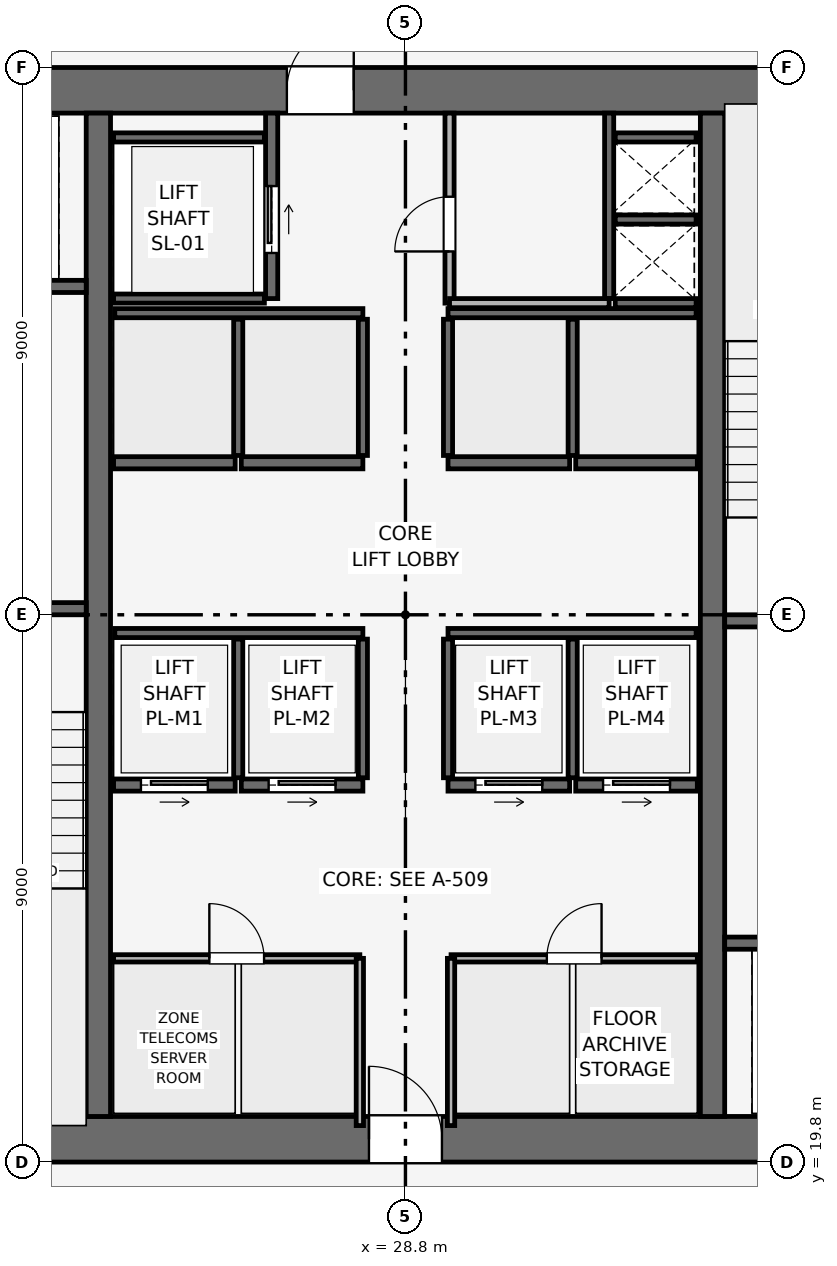
"""IFC4 building model, lengths in metres.
Left out: names, types, materials, properties, quantities, classifications, styles, units other than length and angle.
Written with IfcOpenShell. Run it as: python <this file> out.ifc"""

import sys

from ifc_helpers import new_model, si_unit, direction, frame, frame_2d, origin, place, context, subcontext, project, spatial, rectangle, extrude, element, fill, save


model = new_model("IFC4")
c1 = context("Model", 3, precision=1e-05, world=origin(), true_north=direction((0.0, 1.0)))
c2 = subcontext(c1, "Body", "Model", "MODEL_VIEW")
j1 = project(units=[si_unit("LENGTHUNIT", "METRE"), si_unit("PLANEANGLEUNIT", "RADIAN")], contexts=[c1])
p1 = place(None, origin())
s1 = spatial("IfcSite", under=j1, at=p1, CompositionType="ELEMENT")
p2 = place(p1, origin())
s2 = spatial("IfcBuilding", under=s1, at=p2, CompositionType="ELEMENT")
p3 = place(p2, frame((0.0, 0.0, 203.7)))
s3 = spatial("IfcBuildingStorey", under=s2, at=p3, CompositionType="ELEMENT", Elevation=203.7)
p4 = place(p3, frame((19.8, 20.175, 0.0), z_axis=(0.0, 0.0, 1.0), x_axis=(1.0, 0.0, 0.0)))
e1 = element("IfcWall", 1, at=p4, inside=s3, PredefinedType="SHEAR", context=c2, shape_type="SweptSolid", body=[
    extrude(rectangle(XDim=18.0, YDim=0.75, at=frame_2d((9.0, 0.0))), origin(), (0.0, 0.0, 1.0), 3.75),
])
p5 = place(p4, frame((8.4, 0.0, 0.0)))
e2 = element("IfcOpeningElement", 2, at=p5, cuts=e1, PredefinedType="OPENING", context=c2, shape_type="SweptSolid", body=[
    extrude(rectangle(XDim=1.2, YDim=2.2, at=frame_2d((0.6, 1.1))), frame((0.0, 0.385, 0.0), z_axis=(0.0, -1.0, 0.0), x_axis=(1.0, 0.0, 0.0)), (0.0, 0.0, 1.0), 0.77),
])
p6 = place(p3, frame((19.8, 37.425, 0.0), z_axis=(0.0, 0.0, 1.0), x_axis=(1.0, 0.0, 0.0)))
e3 = element("IfcWall", 3, at=p6, inside=s3, PredefinedType="SHEAR", context=c2, shape_type="SweptSolid", body=[
    extrude(rectangle(XDim=18.0, YDim=0.75, at=frame_2d((9.0, 0.0))), origin(), (0.0, 0.0, 1.0), 3.75),
])
p7 = place(p6, frame((7.05, 0.0, 0.0)))
e4 = element("IfcOpeningElement", 4, at=p7, cuts=e3, PredefinedType="OPENING", context=c2, shape_type="SweptSolid", body=[
    extrude(rectangle(XDim=1.1, YDim=2.15, at=frame_2d((0.55, 1.075))), frame((0.0, 0.385, 0.0), z_axis=(0.0, -1.0, 0.0), x_axis=(1.0, 0.0, 0.0)), (0.0, 0.0, 1.0), 0.77),
])
for number, where, z_axis, x_axis in (
    (5, (23.75, 20.55, 0.0), (0.0, 0.0, 1.0), (0.0, 1.0, 0.0)),
    (6, (33.85, 20.55, 0.0), (0.0, 0.0, 1.0), (0.0, 1.0, 0.0)),
):
    element("IfcWall", number, at=place(p3, frame(where, z_axis=z_axis, x_axis=x_axis)), inside=s3, PredefinedType="SHEAR", context=c2, shape_type="SweptSolid", body=[
        extrude(rectangle(XDim=16.5, YDim=0.4, at=frame_2d((8.25, 0.0))), origin(), (0.0, 0.0, 1.0), 3.75),
    ])
p8 = place(p3, frame((20.4, 28.9, 0.0), z_axis=(0.0, 0.0, 1.0), x_axis=(1.0, 0.0, 0.0)))
e7 = element("IfcWall", 7, at=p8, inside=s3, PredefinedType="SHEAR", context=c2, shape_type="SweptSolid", body=[
    extrude(rectangle(XDim=3.15, YDim=0.2, at=frame_2d((1.575, 0.0))), origin(), (0.0, 0.0, 1.0), 3.5),
])
p9 = place(p8, frame((0.8, 0.0, 0.0)))
e8 = element("IfcOpeningElement", 8, at=p9, cuts=e7, PredefinedType="OPENING", context=c2, shape_type="SweptSolid", body=[
    extrude(rectangle(XDim=1.0, YDim=2.1, at=frame_2d((0.5, 1.05))), frame((0.0, 0.11, 0.0), z_axis=(0.0, -1.0, 0.0), x_axis=(1.0, 0.0, 0.0)), (0.0, 0.0, 1.0), 0.22),
])
p10 = place(p3, frame((34.05, 28.7, 0.0), z_axis=(0.0, 0.0, 1.0), x_axis=(1.0, 0.0, 0.0)))
e9 = element("IfcWall", 9, at=p10, inside=s3, PredefinedType="SHEAR", context=c2, shape_type="SweptSolid", body=[
    extrude(rectangle(XDim=3.15, YDim=0.2, at=frame_2d((1.575, 0.0))), origin(), (0.0, 0.0, 1.0), 3.5),
])
p11 = place(p10, frame((0.8, 0.0, 0.0)))
e10 = element("IfcOpeningElement", 10, at=p11, cuts=e9, PredefinedType="OPENING", context=c2, shape_type="SweptSolid", body=[
    extrude(rectangle(XDim=1.0, YDim=2.1, at=frame_2d((0.5, 1.05))), frame((0.0, 0.11, 0.0), z_axis=(0.0, -1.0, 0.0), x_axis=(1.0, 0.0, 0.0)), (0.0, 0.0, 1.0), 0.22),
])
p12 = place(p3, frame((32.15, 34.0, 0.0), z_axis=(0.0, 0.0, 1.0), x_axis=(0.0, 1.0, 0.0)))
e11 = element("IfcWall", 11, at=p12, inside=s3, PredefinedType="SHEAR", context=c2, shape_type="SweptSolid", body=[
    extrude(rectangle(XDim=3.05, YDim=0.15, at=frame_2d((1.525, 0.0))), origin(), (0.0, 0.0, 1.0), 3.5),
])
for number, where, z_axis, x_axis in (
    (12, (32.25, 33.925, 0.0), (0.0, 0.0, 1.0), (1.0, 0.0, 0.0)),
    (13, (32.25, 35.3, 0.0), (0.0, 0.0, 1.0), (1.0, 0.0, 0.0)),
):
    element("IfcWall", number, at=place(p3, frame(where, z_axis=z_axis, x_axis=x_axis)), inside=s3, PredefinedType="SHEAR", context=c2, shape_type="SweptSolid", body=[
        extrude(rectangle(XDim=1.33, YDim=0.15, at=frame_2d((0.665, 0.0))), origin(), (0.0, 0.0, 1.0), 3.5),
    ])
p13 = place(p3, frame((20.5, 34.2, 0.0), z_axis=(0.0, 0.0, 1.0), x_axis=(1.0, 0.0, 0.0)))
e14 = element("IfcWall", 14, at=p13, inside=s3, PredefinedType="SHEAR", context=c2, shape_type="SweptSolid", body=[
    extrude(rectangle(XDim=3.05, YDim=0.2, at=frame_2d((1.525, 0.0))), origin(), (0.0, 0.0, 1.0), 3.5),
])
p14 = place(p13, frame((0.75, 0.0, 0.0)))
e15 = element("IfcOpeningElement", 15, at=p14, cuts=e14, PredefinedType="OPENING", context=c2, shape_type="SweptSolid", body=[
    extrude(rectangle(XDim=1.1, YDim=2.15, at=frame_2d((0.55, 1.075))), frame((0.0, 0.11, 0.0), z_axis=(0.0, -1.0, 0.0), x_axis=(1.0, 0.0, 0.0)), (0.0, 0.0, 1.0), 0.22),
])
p15 = place(p3, frame((34.05, 23.4, 0.0), z_axis=(0.0, 0.0, 1.0), x_axis=(1.0, 0.0, 0.0)))
e16 = element("IfcWall", 16, at=p15, inside=s3, PredefinedType="SHEAR", context=c2, shape_type="SweptSolid", body=[
    extrude(rectangle(XDim=3.05, YDim=0.2, at=frame_2d((1.525, 0.0))), origin(), (0.0, 0.0, 1.0), 3.5),
])
p16 = place(p15, frame((1.2, 0.0, 0.0)))
e17 = element("IfcOpeningElement", 17, at=p16, cuts=e16, PredefinedType="OPENING", context=c2, shape_type="SweptSolid", body=[
    extrude(rectangle(XDim=1.1, YDim=2.15, at=frame_2d((0.55, 1.075))), frame((0.0, 0.11, 0.0), z_axis=(0.0, -1.0, 0.0), x_axis=(1.0, 0.0, 0.0)), (0.0, 0.0, 1.0), 0.22),
])
p17 = place(p3, frame((26.6, 34.0, 0.0), z_axis=(0.0, 0.0, 1.0), x_axis=(0.0, 1.0, 0.0)))
e18 = element("IfcWall", 18, at=p17, inside=s3, PredefinedType="SHEAR", context=c2, shape_type="SweptSolid", body=[
    extrude(rectangle(XDim=3.05, YDim=0.2, at=frame_2d((1.525, 0.0))), origin(), (0.0, 0.0, 1.0), 3.5),
])
p18 = place(p17, frame((0.75, 0.0, 0.0)))
e19 = element("IfcOpeningElement", 19, at=p18, cuts=e18, PredefinedType="OPENING", context=c2, shape_type="SweptSolid", body=[
    extrude(rectangle(XDim=1.1, YDim=2.15, at=frame_2d((0.55, 1.075))), frame((0.0, 0.11, 0.0), z_axis=(0.0, -1.0, 0.0), x_axis=(1.0, 0.0, 0.0)), (0.0, 0.0, 1.0), 0.22),
])
for number, where, z_axis, x_axis in (
    (20, (24.0, 34.0, 0.0), (0.0, 0.0, 1.0), (1.0, 0.0, 0.0)),
    (21, (24.0, 36.65, 0.0), (0.0, 0.0, 1.0), (1.0, 0.0, 0.0)),
):
    element("IfcWall", number, at=place(p3, frame(where, z_axis=z_axis, x_axis=x_axis)), inside=s3, PredefinedType="SHEAR", context=c2, shape_type="SweptSolid", body=[
        extrude(rectangle(XDim=2.48, YDim=0.15, at=frame_2d((1.24, 0.0))), origin(), (0.0, 0.0, 1.0), 3.5),
    ])
p19 = place(p3, frame((24.0, 26.0, 0.0), z_axis=(0.0, 0.0, 1.0), x_axis=(1.0, 0.0, 0.0)))
e22 = element("IfcWall", 22, at=p19, inside=s3, PredefinedType="SHEAR", context=c2, shape_type="SweptSolid", body=[
    extrude(rectangle(XDim=2.0, YDim=0.2, at=frame_2d((1.0, 0.0))), origin(), (0.0, 0.0, 1.0), 3.5),
])
p20 = place(p19, frame((0.45, 0.0, 0.0)))
e23 = element("IfcOpeningElement", 23, at=p20, cuts=e22, PredefinedType="OPENING", context=c2, shape_type="SweptSolid", body=[
    extrude(rectangle(XDim=1.1, YDim=2.15, at=frame_2d((0.55, 1.075))), frame((0.0, 0.11, 0.0), z_axis=(0.0, -1.0, 0.0), x_axis=(1.0, 0.0, 0.0)), (0.0, 0.0, 1.0), 0.22),
])
p21 = place(p3, frame((26.1, 26.0, 0.0), z_axis=(0.0, 0.0, 1.0), x_axis=(1.0, 0.0, 0.0)))
e24 = element("IfcWall", 24, at=p21, inside=s3, PredefinedType="SHEAR", context=c2, shape_type="SweptSolid", body=[
    extrude(rectangle(XDim=2.0, YDim=0.2, at=frame_2d((1.0, 0.0))), origin(), (0.0, 0.0, 1.0), 3.5),
])
p22 = place(p21, frame((0.45, 0.0, 0.0)))
e25 = element("IfcOpeningElement", 25, at=p22, cuts=e24, PredefinedType="OPENING", context=c2, shape_type="SweptSolid", body=[
    extrude(rectangle(XDim=1.1, YDim=2.15, at=frame_2d((0.55, 1.075))), frame((0.0, 0.11, 0.0), z_axis=(0.0, -1.0, 0.0), x_axis=(1.0, 0.0, 0.0)), (0.0, 0.0, 1.0), 0.22),
])
p23 = place(p3, frame((29.5, 26.0, 0.0), z_axis=(0.0, 0.0, 1.0), x_axis=(1.0, 0.0, 0.0)))
e26 = element("IfcWall", 26, at=p23, inside=s3, PredefinedType="SHEAR", context=c2, shape_type="SweptSolid", body=[
    extrude(rectangle(XDim=2.0, YDim=0.2, at=frame_2d((1.0, 0.0))), origin(), (0.0, 0.0, 1.0), 3.5),
])
p24 = place(p23, frame((0.45, 0.0, 0.0)))
e27 = element("IfcOpeningElement", 27, at=p24, cuts=e26, PredefinedType="OPENING", context=c2, shape_type="SweptSolid", body=[
    extrude(rectangle(XDim=1.1, YDim=2.15, at=frame_2d((0.55, 1.075))), frame((0.0, 0.11, 0.0), z_axis=(0.0, -1.0, 0.0), x_axis=(1.0, 0.0, 0.0)), (0.0, 0.0, 1.0), 0.22),
])
p25 = place(p3, frame((31.6, 26.0, 0.0), z_axis=(0.0, 0.0, 1.0), x_axis=(1.0, 0.0, 0.0)))
e28 = element("IfcWall", 28, at=p25, inside=s3, PredefinedType="SHEAR", context=c2, shape_type="SweptSolid", body=[
    extrude(rectangle(XDim=2.0, YDim=0.2, at=frame_2d((1.0, 0.0))), origin(), (0.0, 0.0, 1.0), 3.5),
])
p26 = place(p25, frame((0.45, 0.0, 0.0)))
e29 = element("IfcOpeningElement", 29, at=p26, cuts=e28, PredefinedType="OPENING", context=c2, shape_type="SweptSolid", body=[
    extrude(rectangle(XDim=1.1, YDim=2.15, at=frame_2d((0.55, 1.075))), frame((0.0, 0.11, 0.0), z_axis=(0.0, -1.0, 0.0), x_axis=(1.0, 0.0, 0.0)), (0.0, 0.0, 1.0), 0.22),
])
for number, where, z_axis, x_axis in (
    (30, (24.0, 31.3, 0.0), (0.0, 0.0, 1.0), (1.0, 0.0, 0.0)),
    (31, (26.1, 31.3, 0.0), (0.0, 0.0, 1.0), (1.0, 0.0, 0.0)),
    (32, (29.5, 31.3, 0.0), (0.0, 0.0, 1.0), (1.0, 0.0, 0.0)),
    (33, (31.6, 31.3, 0.0), (0.0, 0.0, 1.0), (1.0, 0.0, 0.0)),
):
    element("IfcWall", number, at=place(p3, frame(where, z_axis=z_axis, x_axis=x_axis)), inside=s3, PredefinedType="SHEAR", context=c2, shape_type="SweptSolid", body=[
        extrude(rectangle(XDim=2.0, YDim=0.2, at=frame_2d((1.0, 0.0))), origin(), (0.0, 0.0, 1.0), 3.5),
    ])
p27 = place(p3, frame((32.25, 36.65, 0.0), z_axis=(0.0, 0.0, 1.0), x_axis=(1.0, 0.0, 0.0)))
e34 = element("IfcWall", 34, at=p27, inside=s3, PredefinedType="SHEAR", context=c2, shape_type="SweptSolid", body=[
    extrude(rectangle(XDim=1.33, YDim=0.15, at=frame_2d((0.665, 0.0))), origin(), (0.0, 0.0, 1.0), 3.5),
])
for number, where, z_axis, x_axis in (
    (35, (24.02, 28.5, 0.0), (0.0, 0.0, 1.0), (1.0, 0.0, 0.0)),
    (36, (29.5, 28.5, 0.0), (0.0, 0.0, 1.0), (1.0, 0.0, 0.0)),
):
    element("IfcWall", number, at=place(p3, frame(where, z_axis=z_axis, x_axis=x_axis)), inside=s3, PredefinedType="SHEAR", context=c2, shape_type="SweptSolid", body=[
        extrude(rectangle(XDim=4.08, YDim=0.15, at=frame_2d((2.04, 0.0))), origin(), (0.0, 0.0, 1.0), 3.5),
    ])
for number, where, z_axis, x_axis in (
    (37, (26.05, 26.12, 0.0), (0.0, 0.0, 1.0), (0.0, 1.0, 0.0)),
    (38, (28.1, 26.12, 0.0), (0.0, 0.0, 1.0), (0.0, 1.0, 0.0)),
    (39, (29.5, 26.12, 0.0), (0.0, 0.0, 1.0), (0.0, 1.0, 0.0)),
    (40, (31.55, 26.12, 0.0), (0.0, 0.0, 1.0), (0.0, 1.0, 0.0)),
):
    element("IfcWall", number, at=place(p3, frame(where, z_axis=z_axis, x_axis=x_axis)), inside=s3, PredefinedType="SHEAR", context=c2, shape_type="SweptSolid", body=[
        extrude(rectangle(XDim=2.28, YDim=0.15, at=frame_2d((1.14, 0.0))), origin(), (0.0, 0.0, 1.0), 3.5),
    ])
for number, where, z_axis, x_axis in (
    (41, (24.02, 33.76, 0.0), (0.0, 0.0, 1.0), (1.0, 0.0, 0.0)),
    (42, (29.5, 33.76, 0.0), (0.0, 0.0, 1.0), (1.0, 0.0, 0.0)),
):
    element("IfcWall", number, at=place(p3, frame(where, z_axis=z_axis, x_axis=x_axis)), inside=s3, PredefinedType="SHEAR", context=c2, shape_type="SweptSolid", body=[
        extrude(rectangle(XDim=4.08, YDim=0.15, at=frame_2d((2.04, 0.0))), origin(), (0.0, 0.0, 1.0), 3.5),
    ])
for number, where, z_axis, x_axis in (
    (43, (26.05, 31.42, 0.0), (0.0, 0.0, 1.0), (0.0, 1.0, 0.0)),
    (44, (28.1, 31.42, 0.0), (0.0, 0.0, 1.0), (0.0, 1.0, 0.0)),
    (45, (29.5, 31.42, 0.0), (0.0, 0.0, 1.0), (0.0, 1.0, 0.0)),
    (46, (31.55, 31.42, 0.0), (0.0, 0.0, 1.0), (0.0, 1.0, 0.0)),
):
    element("IfcWall", number, at=place(p3, frame(where, z_axis=z_axis, x_axis=x_axis)), inside=s3, PredefinedType="SHEAR", context=c2, shape_type="SweptSolid", body=[
        extrude(rectangle(XDim=2.24, YDim=0.15, at=frame_2d((1.12, 0.0))), origin(), (0.0, 0.0, 1.0), 3.5),
    ])
p28 = place(p3, frame((29.525, 33.925, 0.0), z_axis=(0.0, 0.0, 1.0), x_axis=(0.0, 1.0, 0.0)))
e47 = element("IfcWall", 47, at=p28, inside=s3, PredefinedType="PARTITIONING", context=c2, shape_type="SweptSolid", body=[
    extrude(rectangle(XDim=3.125, YDim=0.15, at=frame_2d((1.562, 0.0))), origin(), (0.0, 0.0, 1.0), 3.5),
])
p29 = place(p28, frame((0.85, 0.0, 0.0)))
e48 = element("IfcOpeningElement", 48, at=p29, cuts=e47, PredefinedType="OPENING", context=c2, shape_type="SweptSolid", body=[
    extrude(rectangle(XDim=0.9, YDim=2.1, at=frame_2d((0.45, 1.05))), frame((0.0, 0.085, 0.0), z_axis=(0.0, -1.0, 0.0), x_axis=(1.0, 0.0, 0.0)), (0.0, 0.0, 1.0), 0.17),
])
p30 = place(p3, frame((29.525, 33.925, 0.0), z_axis=(0.0, 0.0, 1.0), x_axis=(1.0, 0.0, 0.0)))
e49 = element("IfcWall", 49, at=p30, inside=s3, PredefinedType="PARTITIONING", context=c2, shape_type="SweptSolid", body=[
    extrude(rectangle(XDim=2.625, YDim=0.15, at=frame_2d((1.312, 0.0))), origin(), (0.0, 0.0, 1.0), 3.5),
])
p31 = place(p3, frame((24.0, 23.15, 0.0), z_axis=(0.0, 0.0, 1.0), x_axis=(1.0, 0.0, 0.0)))
e50 = element("IfcWall", 50, at=p31, inside=s3, PredefinedType="PARTITIONING", context=c2, shape_type="SweptSolid", body=[
    extrude(rectangle(XDim=4.05, YDim=0.12, at=frame_2d((2.025, 0.0))), origin(), (0.0, 0.0, 1.0), 3.5),
])
p32 = place(p31, frame((1.575, 0.0, 0.0)))
e51 = element("IfcOpeningElement", 51, at=p32, cuts=e50, PredefinedType="OPENING", context=c2, shape_type="SweptSolid", body=[
    extrude(rectangle(XDim=0.9, YDim=2.1, at=frame_2d((0.45, 1.05))), frame((0.0, 0.07, 0.0), z_axis=(0.0, -1.0, 0.0), x_axis=(1.0, 0.0, 0.0)), (0.0, 0.0, 1.0), 0.14),
])
p33 = place(p3, frame((28.05, 20.4, 0.0), z_axis=(0.0, 0.0, 1.0), x_axis=(0.0, 1.0, 0.0)))
e52 = element("IfcWall", 52, at=p33, inside=s3, PredefinedType="PARTITIONING", context=c2, shape_type="SweptSolid", body=[
    extrude(rectangle(XDim=2.75, YDim=0.12, at=frame_2d((1.375, 0.0))), origin(), (0.0, 0.0, 1.0), 3.5),
])
p34 = place(p3, frame((29.55, 23.15, 0.0), z_axis=(0.0, 0.0, 1.0), x_axis=(1.0, 0.0, 0.0)))
e53 = element("IfcWall", 53, at=p34, inside=s3, PredefinedType="PARTITIONING", context=c2, shape_type="SweptSolid", body=[
    extrude(rectangle(XDim=4.05, YDim=0.12, at=frame_2d((2.025, 0.0))), origin(), (0.0, 0.0, 1.0), 3.5),
])
p35 = place(p34, frame((1.575, 0.0, 0.0)))
e54 = element("IfcOpeningElement", 54, at=p35, cuts=e53, PredefinedType="OPENING", context=c2, shape_type="SweptSolid", body=[
    extrude(rectangle(XDim=0.9, YDim=2.1, at=frame_2d((0.45, 1.05))), frame((0.0, 0.07, 0.0), z_axis=(0.0, -1.0, 0.0), x_axis=(1.0, 0.0, 0.0)), (0.0, 0.0, 1.0), 0.14),
])
p36 = place(p3, frame((29.55, 20.4, 0.0), z_axis=(0.0, 0.0, 1.0), x_axis=(0.0, 1.0, 0.0)))
e55 = element("IfcWall", 55, at=p36, inside=s3, PredefinedType="PARTITIONING", context=c2, shape_type="SweptSolid", body=[
    extrude(rectangle(XDim=2.75, YDim=0.12, at=frame_2d((1.375, 0.0))), origin(), (0.0, 0.0, 1.0), 3.5),
])
p37 = place(p18, origin())
e56 = element("IfcDoor", 56, at=p37, inside=s3, OperationType="SLIDING_TO_RIGHT", PredefinedType="DOOR", context=c2, shape_type="SweptSolid", body=[
    extrude(rectangle(XDim=1.1, YDim=2.15, at=frame_2d((0.55, 1.075))), frame((0.0, 0.025, 0.0), z_axis=(0.0, -1.0, 0.0), x_axis=(1.0, 0.0, 0.0)), (0.0, 0.0, 1.0), 0.05),
])
fill(e19, e56)
p38 = place(p20, origin())
e57 = element("IfcDoor", 57, at=p38, inside=s3, OperationType="SLIDING_TO_RIGHT", PredefinedType="DOOR", context=c2, shape_type="SweptSolid", body=[
    extrude(rectangle(XDim=1.1, YDim=2.15, at=frame_2d((0.55, 1.075))), frame((0.0, 0.025, 0.0), z_axis=(0.0, -1.0, 0.0), x_axis=(1.0, 0.0, 0.0)), (0.0, 0.0, 1.0), 0.05),
])
fill(e23, e57)
p39 = place(p22, origin())
e58 = element("IfcDoor", 58, at=p39, inside=s3, OperationType="SLIDING_TO_RIGHT", PredefinedType="DOOR", context=c2, shape_type="SweptSolid", body=[
    extrude(rectangle(XDim=1.1, YDim=2.15, at=frame_2d((0.55, 1.075))), frame((0.0, 0.025, 0.0), z_axis=(0.0, -1.0, 0.0), x_axis=(1.0, 0.0, 0.0)), (0.0, 0.0, 1.0), 0.05),
])
fill(e25, e58)
p40 = place(p24, origin())
e59 = element("IfcDoor", 59, at=p40, inside=s3, OperationType="SLIDING_TO_RIGHT", PredefinedType="DOOR", context=c2, shape_type="SweptSolid", body=[
    extrude(rectangle(XDim=1.1, YDim=2.15, at=frame_2d((0.55, 1.075))), frame((0.0, 0.025, 0.0), z_axis=(0.0, -1.0, 0.0), x_axis=(1.0, 0.0, 0.0)), (0.0, 0.0, 1.0), 0.05),
])
fill(e27, e59)
p41 = place(p26, origin())
e60 = element("IfcDoor", 60, at=p41, inside=s3, OperationType="SLIDING_TO_RIGHT", PredefinedType="DOOR", context=c2, shape_type="SweptSolid", body=[
    extrude(rectangle(XDim=1.1, YDim=2.15, at=frame_2d((0.55, 1.075))), frame((0.0, 0.025, 0.0), z_axis=(0.0, -1.0, 0.0), x_axis=(1.0, 0.0, 0.0)), (0.0, 0.0, 1.0), 0.05),
])
fill(e29, e60)
p42 = place(p29, origin())
e61 = element("IfcDoor", 61, at=p42, inside=s3, OperationType="SINGLE_SWING_LEFT", PredefinedType="DOOR", context=c2, shape_type="SweptSolid", body=[
    extrude(rectangle(XDim=0.9, YDim=2.1, at=frame_2d((0.45, 1.05))), frame((0.0, 0.025, 0.0), z_axis=(0.0, -1.0, 0.0), x_axis=(1.0, 0.0, 0.0)), (0.0, 0.0, 1.0), 0.05),
])
fill(e48, e61)
p43 = place(p32, origin())
e62 = element("IfcDoor", 62, at=p43, inside=s3, OperationType="SINGLE_SWING_LEFT", PredefinedType="DOOR", context=c2, shape_type="SweptSolid", body=[
    extrude(rectangle(XDim=0.9, YDim=2.1, at=frame_2d((0.45, 1.05))), frame((0.0, 0.025, 0.0), z_axis=(0.0, -1.0, 0.0), x_axis=(1.0, 0.0, 0.0)), (0.0, 0.0, 1.0), 0.05),
])
fill(e51, e62)
p44 = place(p35, origin())
e63 = element("IfcDoor", 63, at=p44, inside=s3, OperationType="SINGLE_SWING_RIGHT", PredefinedType="DOOR", context=c2, shape_type="SweptSolid", body=[
    extrude(rectangle(XDim=0.9, YDim=2.1, at=frame_2d((0.45, 1.05))), frame((0.0, 0.025, 0.0), z_axis=(0.0, -1.0, 0.0), x_axis=(1.0, 0.0, 0.0)), (0.0, 0.0, 1.0), 0.05),
])
fill(e54, e63)
p45 = place(p5, origin())
e64 = element("IfcDoor", 64, at=p45, inside=s3, OperationType="SINGLE_SWING_LEFT", PredefinedType="DOOR", context=c2, shape_type="SweptSolid", body=[
    extrude(rectangle(XDim=1.2, YDim=2.2, at=frame_2d((0.6, 1.1))), frame((0.0, 0.025, 0.0), z_axis=(0.0, -1.0, 0.0), x_axis=(1.0, 0.0, 0.0)), (0.0, 0.0, 1.0), 0.05),
])
fill(e2, e64)
p46 = place(p7, origin())
e65 = element("IfcDoor", 65, at=p46, inside=s3, OperationType="SINGLE_SWING_RIGHT", PredefinedType="DOOR", context=c2, shape_type="SweptSolid", body=[
    extrude(rectangle(XDim=1.1, YDim=2.15, at=frame_2d((0.55, 1.075))), frame((0.0, 0.025, 0.0), z_axis=(0.0, -1.0, 0.0), x_axis=(1.0, 0.0, 0.0)), (0.0, 0.0, 1.0), 0.05),
])
fill(e4, e65)
save(model, sys.argv[1])
